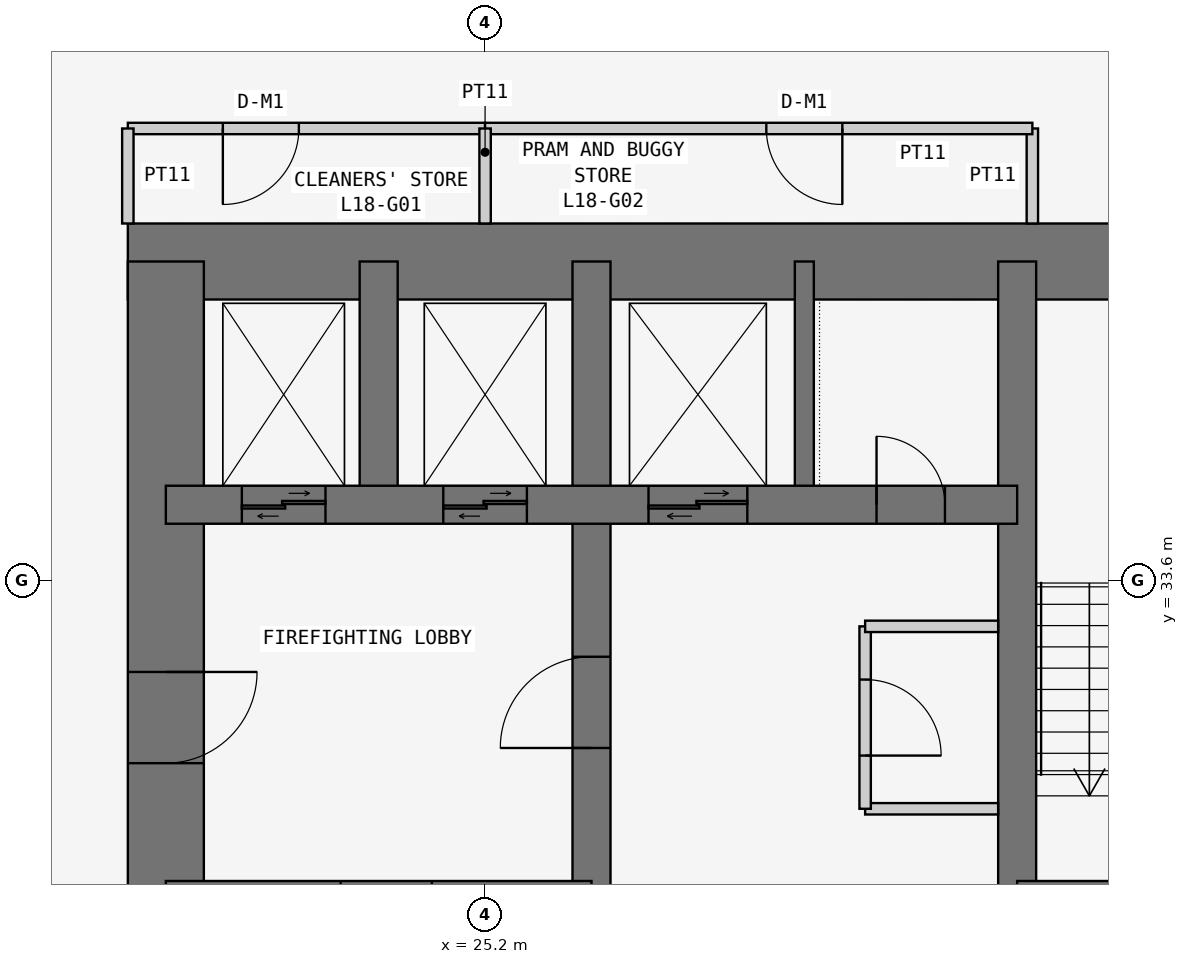
"""IFC4 building model, lengths in metres.
Left out: names, types, materials, properties, quantities, classifications, styles, units other than length and angle.
Written with IfcOpenShell. Run it as: python <this file> out.ifc"""

import sys

from ifc_helpers import new_model, si_unit, direction, frame, frame_2d, origin, place, context, subcontext, project, spatial, rectangle, extrude, element, fill, save


model = new_model("IFC4")
c1 = context("Model", 3, precision=1e-05, world=origin(), true_north=direction((0.0, 1.0)))
c2 = subcontext(c1, "Body", "Model", "MODEL_VIEW")
j1 = project(units=[si_unit("LENGTHUNIT", "METRE"), si_unit("PLANEANGLEUNIT", "RADIAN")], contexts=[c1])
p1 = place(None, origin())
s1 = spatial("IfcSite", under=j1, at=p1, CompositionType="ELEMENT")
p2 = place(p1, origin())
s2 = spatial("IfcBuilding", under=s1, at=p2, CompositionType="ELEMENT")
p3 = place(p2, frame((0.0, 0.0, 74.1)))
s3 = spatial("IfcBuildingStorey", under=s2, at=p3, CompositionType="ELEMENT", Elevation=74.1)
p4 = place(p3, frame((37.8, 37.8, 0.0), z_axis=(0.0, 0.0, 1.0), x_axis=(-1.0, 0.0, 0.0)))
e1 = element("IfcWall", 1, at=p4, inside=s3, PredefinedType="SHEAR", context=c2, shape_type="SweptSolid", body=[
    extrude(rectangle(XDim=17.3, YDim=1.0, at=frame_2d((8.65, 0.0))), origin(), (0.0, 0.0, 1.0), 3.6),
])
p5 = place(p3, frame((21.0, 37.8, 0.0), z_axis=(0.0, 0.0, 1.0), x_axis=(0.0, -1.0, 0.0)))
e2 = element("IfcWall", 2, at=p5, inside=s3, PredefinedType="SHEAR", context=c2, shape_type="SweptSolid", body=[
    extrude(rectangle(XDim=17.3, YDim=1.0, at=frame_2d((8.65, 0.0))), origin(), (0.0, 0.0, 1.0), 3.6),
])
p6 = place(p5, frame((5.4, 0.0, 0.0)))
e3 = element("IfcOpeningElement", 3, at=p6, cuts=e2, PredefinedType="OPENING", context=c2, shape_type="SweptSolid", body=[
    extrude(rectangle(XDim=1.2, YDim=2.1, at=frame_2d((0.6, 1.05))), frame((0.0, 0.51, 0.0), z_axis=(0.0, -1.0, 0.0), x_axis=(1.0, 0.0, 0.0)), (0.0, 0.0, 1.0), 1.02),
])
p7 = place(p3, frame((26.6, 21.0, 0.0), z_axis=(0.0, 0.0, 1.0), x_axis=(0.0, 1.0, 0.0)))
e4 = element("IfcWall", 4, at=p7, inside=s3, PredefinedType="SHEAR", context=c2, shape_type="SweptSolid", body=[
    extrude(rectangle(XDim=16.8, YDim=0.5, at=frame_2d((8.4, 0.0))), origin(), (0.0, 0.0, 1.0), 3.6),
])
p8 = place(p7, frame((10.4, 0.0, 0.0)))
e5 = element("IfcOpeningElement", 5, at=p8, cuts=e4, PredefinedType="OPENING", context=c2, shape_type="SweptSolid", body=[
    extrude(rectangle(XDim=1.2, YDim=2.1, at=frame_2d((0.6, 1.05))), frame((0.0, 0.26, 0.0), z_axis=(0.0, -1.0, 0.0), x_axis=(1.0, 0.0, 0.0)), (0.0, 0.0, 1.0), 0.52),
])
p9 = place(p3, frame((21.0, 29.4, 0.0), z_axis=(0.0, 0.0, 1.0), x_axis=(1.0, 0.0, 0.0)))
e6 = element("IfcWall", 6, at=p9, inside=s3, PredefinedType="SHEAR", context=c2, shape_type="SweptSolid", body=[
    extrude(rectangle(XDim=5.6, YDim=0.5, at=frame_2d((2.8, 0.0))), origin(), (0.0, 0.0, 1.0), 3.6),
])
p10 = place(p9, frame((2.3, 0.0, 0.0)))
e7 = element("IfcOpeningElement", 7, at=p10, cuts=e6, PredefinedType="OPENING", context=c2, shape_type="SweptSolid", body=[
    extrude(rectangle(XDim=1.2, YDim=2.1, at=frame_2d((0.6, 1.05))), frame((0.0, 0.26, 0.0), z_axis=(0.0, -1.0, 0.0), x_axis=(1.0, 0.0, 0.0)), (0.0, 0.0, 1.0), 0.52),
])
p11 = place(p3, frame((21.0, 34.6, 0.0), z_axis=(0.0, 0.0, 1.0), x_axis=(1.0, 0.0, 0.0)))
e8 = element("IfcWall", 8, at=p11, inside=s3, PredefinedType="SHEAR", context=c2, shape_type="SweptSolid", body=[
    extrude(rectangle(XDim=11.2, YDim=0.5, at=frame_2d((5.6, 0.0))), origin(), (0.0, 0.0, 1.0), 3.6),
])
p12 = place(p11, frame((9.35, 0.0, 0.0)))
e9 = element("IfcOpeningElement", 9, at=p12, cuts=e8, PredefinedType="OPENING", context=c2, shape_type="SweptSolid", body=[
    extrude(rectangle(XDim=0.9, YDim=2.1, at=frame_2d((0.45, 1.05))), frame((0.0, 0.26, 0.0), z_axis=(0.0, -1.0, 0.0), x_axis=(1.0, 0.0, 0.0)), (0.0, 0.0, 1.0), 0.52),
])
p13 = place(p11, frame((1.0, 0.0, 0.0)))
e10 = element("IfcOpeningElement", 10, at=p13, cuts=e8, PredefinedType="OPENING", context=c2, shape_type="SweptSolid", body=[
    extrude(rectangle(XDim=1.1, YDim=2.1, at=frame_2d((0.55, 1.05))), frame((0.0, 0.26, 0.0), z_axis=(0.0, -1.0, 0.0), x_axis=(1.0, 0.0, 0.0)), (0.0, 0.0, 1.0), 0.52),
])
p14 = place(p11, frame((3.65, 0.0, 0.0)))
e11 = element("IfcOpeningElement", 11, at=p14, cuts=e8, PredefinedType="OPENING", context=c2, shape_type="SweptSolid", body=[
    extrude(rectangle(XDim=1.1, YDim=2.1, at=frame_2d((0.55, 1.05))), frame((0.0, 0.26, 0.0), z_axis=(0.0, -1.0, 0.0), x_axis=(1.0, 0.0, 0.0)), (0.0, 0.0, 1.0), 0.52),
])
p15 = place(p11, frame((6.35, 0.0, 0.0)))
e12 = element("IfcOpeningElement", 12, at=p15, cuts=e8, PredefinedType="OPENING", context=c2, shape_type="SweptSolid", body=[
    extrude(rectangle(XDim=1.3, YDim=2.1, at=frame_2d((0.65, 1.05))), frame((0.0, 0.26, 0.0), z_axis=(0.0, -1.0, 0.0), x_axis=(1.0, 0.0, 0.0)), (0.0, 0.0, 1.0), 0.52),
])
p16 = place(p3, frame((23.8, 34.6, 0.0), z_axis=(0.0, 0.0, 1.0), x_axis=(0.0, 1.0, 0.0)))
e13 = element("IfcWall", 13, at=p16, inside=s3, PredefinedType="SHEAR", context=c2, shape_type="SweptSolid", body=[
    extrude(rectangle(XDim=3.2, YDim=0.5, at=frame_2d((1.6, 0.0))), origin(), (0.0, 0.0, 1.0), 3.6),
])
p17 = place(p3, frame((32.2, 29.15, 0.0), z_axis=(0.0, 0.0, 1.0), x_axis=(0.0, 1.0, 0.0)))
e14 = element("IfcWall", 14, at=p17, inside=s3, PredefinedType="SHEAR", context=c2, shape_type="SweptSolid", body=[
    extrude(rectangle(XDim=8.65, YDim=0.5, at=frame_2d((4.325, 0.0))), origin(), (0.0, 0.0, 1.0), 3.6),
])
p18 = place(p3, frame((32.2, 29.4, 0.0), z_axis=(0.0, 0.0, 1.0), x_axis=(1.0, 0.0, 0.0)))
e15 = element("IfcWall", 15, at=p18, inside=s3, PredefinedType="SHEAR", context=c2, shape_type="SweptSolid", body=[
    extrude(rectangle(XDim=5.6, YDim=0.5, at=frame_2d((2.8, 0.0))), origin(), (0.0, 0.0, 1.0), 3.6),
])
p19 = place(p18, frame((2.0, 0.0, 0.0)))
e16 = element("IfcOpeningElement", 16, at=p19, cuts=e15, PredefinedType="OPENING", context=c2, shape_type="SweptSolid", body=[
    extrude(rectangle(XDim=1.2, YDim=2.1, at=frame_2d((0.6, 1.05))), frame((0.0, 0.26, 0.0), z_axis=(0.0, -1.0, 0.0), x_axis=(1.0, 0.0, 0.0)), (0.0, 0.0, 1.0), 0.52),
])
p20 = place(p3, frame((29.4, 34.6, 0.0), z_axis=(0.0, 0.0, 1.0), x_axis=(0.0, 1.0, 0.0)))
e17 = element("IfcWall", 17, at=p20, inside=s3, PredefinedType="SHEAR", context=c2, shape_type="SweptSolid", body=[
    extrude(rectangle(XDim=3.2, YDim=0.25, at=frame_2d((1.6, 0.0))), origin(), (0.0, 0.0, 1.0), 3.6),
])
p21 = place(p3, frame((25.2, 39.55, 0.0), z_axis=(0.0, 0.0, 1.0), x_axis=(-1.0, 0.0, 0.0)))
e18 = element("IfcWall", 18, at=p21, inside=s3, PredefinedType="PARTITIONING", context=c2, shape_type="SweptSolid", body=[
    extrude(rectangle(XDim=4.7, YDim=0.15, at=frame_2d((2.35, 0.0))), origin(), (0.0, 0.0, 1.0), 3.45),
])
p22 = place(p21, frame((2.45, 0.0, 0.0)))
e19 = element("IfcOpeningElement", 19, at=p22, cuts=e18, PredefinedType="OPENING", context=c2, shape_type="SweptSolid", body=[
    extrude(rectangle(XDim=1.0, YDim=2.1, at=frame_2d((0.5, 1.05))), frame((0.0, 0.085, 0.0), z_axis=(0.0, -1.0, 0.0), x_axis=(1.0, 0.0, 0.0)), (0.0, 0.0, 1.0), 0.17),
])
for number, where, z_axis, x_axis in (
    (20, (20.5, 39.55, 0.0), (0.0, 0.0, 1.0), (0.0, -1.0, 0.0)),
    (21, (32.4, 38.3, 0.0), (0.0, 0.0, 1.0), (0.0, 1.0, 0.0)),
):
    element("IfcWall", number, at=place(p3, frame(where, z_axis=z_axis, x_axis=x_axis)), inside=s3, PredefinedType="PARTITIONING", context=c2, shape_type="SweptSolid", body=[
        extrude(rectangle(XDim=1.25, YDim=0.15, at=frame_2d((0.625, 0.0))), origin(), (0.0, 0.0, 1.0), 3.45),
    ])
p23 = place(p3, frame((32.4, 39.55, 0.0), z_axis=(0.0, 0.0, 1.0), x_axis=(-1.0, 0.0, 0.0)))
e22 = element("IfcWall", 22, at=p23, inside=s3, PredefinedType="PARTITIONING", context=c2, shape_type="SweptSolid", body=[
    extrude(rectangle(XDim=7.2, YDim=0.15, at=frame_2d((3.6, 0.0))), origin(), (0.0, 0.0, 1.0), 3.45),
])
p24 = place(p23, frame((2.5, 0.0, 0.0)))
e23 = element("IfcOpeningElement", 23, at=p24, cuts=e22, PredefinedType="OPENING", context=c2, shape_type="SweptSolid", body=[
    extrude(rectangle(XDim=1.0, YDim=2.1, at=frame_2d((0.5, 1.05))), frame((0.0, 0.085, 0.0), z_axis=(0.0, -1.0, 0.0), x_axis=(1.0, 0.0, 0.0)), (0.0, 0.0, 1.0), 0.17),
])
p25 = place(p3, frame((25.2, 38.3, 0.0), z_axis=(0.0, 0.0, 1.0), x_axis=(0.0, 1.0, 0.0)))
e24 = element("IfcWall", 24, at=p25, inside=s3, PredefinedType="PARTITIONING", context=c2, shape_type="SweptSolid", body=[
    extrude(rectangle(XDim=1.25, YDim=0.15, at=frame_2d((0.625, 0.0))), origin(), (0.0, 0.0, 1.0), 2.767),
])
p26 = place(p3, frame((31.95, 30.6, 0.0), z_axis=(0.0, 0.0, 1.0), x_axis=(-1.0, 0.0, 0.0)))
e25 = element("IfcWall", 25, at=p26, inside=s3, PredefinedType="PARTITIONING", context=c2, shape_type="SweptSolid", body=[
    extrude(rectangle(XDim=1.75, YDim=0.15, at=frame_2d((0.875, 0.0))), origin(), (0.0, 0.0, 1.0), 3.45),
])
p27 = place(p3, frame((30.2, 30.6, 0.0), z_axis=(0.0, 0.0, 1.0), x_axis=(0.0, 1.0, 0.0)))
e26 = element("IfcWall", 26, at=p27, inside=s3, PredefinedType="PARTITIONING", context=c2, shape_type="SweptSolid", body=[
    extrude(rectangle(XDim=2.4, YDim=0.15, at=frame_2d((1.2, 0.0))), origin(), (0.0, 0.0, 1.0), 3.45),
])
p28 = place(p27, frame((0.7, 0.0, 0.0)))
e27 = element("IfcOpeningElement", 27, at=p28, cuts=e26, PredefinedType="OPENING", context=c2, shape_type="SweptSolid", body=[
    extrude(rectangle(XDim=1.0, YDim=2.1, at=frame_2d((0.5, 1.05))), frame((0.0, 0.085, 0.0), z_axis=(0.0, -1.0, 0.0), x_axis=(1.0, 0.0, 0.0)), (0.0, 0.0, 1.0), 0.17),
])
p29 = place(p3, frame((30.2, 33.0, 0.0), z_axis=(0.0, 0.0, 1.0), x_axis=(1.0, 0.0, 0.0)))
e28 = element("IfcWall", 28, at=p29, inside=s3, PredefinedType="PARTITIONING", context=c2, shape_type="SweptSolid", body=[
    extrude(rectangle(XDim=1.75, YDim=0.15, at=frame_2d((0.875, 0.0))), origin(), (0.0, 0.0, 1.0), 3.45),
])
p30 = place(p22, origin())
e29 = element("IfcDoor", 29, at=p30, inside=s3, OperationType="SINGLE_SWING_RIGHT", PredefinedType="DOOR", context=c2, shape_type="SweptSolid", body=[
    extrude(rectangle(XDim=1.0, YDim=2.1, at=frame_2d((0.5, 1.05))), frame((0.0, 0.025, 0.0), z_axis=(0.0, -1.0, 0.0), x_axis=(1.0, 0.0, 0.0)), (0.0, 0.0, 1.0), 0.05),
])
fill(e19, e29)
p31 = place(p24, origin())
e30 = element("IfcDoor", 30, at=p31, inside=s3, OperationType="SINGLE_SWING_LEFT", PredefinedType="DOOR", context=c2, shape_type="SweptSolid", body=[
    extrude(rectangle(XDim=1.0, YDim=2.1, at=frame_2d((0.5, 1.05))), frame((0.0, 0.025, 0.0), z_axis=(0.0, -1.0, 0.0), x_axis=(1.0, 0.0, 0.0)), (0.0, 0.0, 1.0), 0.05),
])
fill(e23, e30)
p32 = place(p6, origin())
e31 = element("IfcDoor", 31, at=p32, inside=s3, OperationType="SINGLE_SWING_LEFT", PredefinedType="DOOR", context=c2, shape_type="SweptSolid", body=[
    extrude(rectangle(XDim=1.2, YDim=2.1, at=frame_2d((0.6, 1.05))), frame((0.0, 0.025, 0.0), z_axis=(0.0, -1.0, 0.0), x_axis=(1.0, 0.0, 0.0)), (0.0, 0.0, 1.0), 0.05),
])
fill(e3, e31)
p33 = place(p8, origin())
e32 = element("IfcDoor", 32, at=p33, inside=s3, OperationType="SINGLE_SWING_LEFT", PredefinedType="DOOR", context=c2, shape_type="SweptSolid", body=[
    extrude(rectangle(XDim=1.2, YDim=2.1, at=frame_2d((0.6, 1.05))), frame((0.0, 0.025, 0.0), z_axis=(0.0, -1.0, 0.0), x_axis=(1.0, 0.0, 0.0)), (0.0, 0.0, 1.0), 0.05),
])
fill(e5, e32)
p34 = place(p12, origin())
e33 = element("IfcDoor", 33, at=p34, inside=s3, OperationType="SINGLE_SWING_LEFT", PredefinedType="DOOR", context=c2, shape_type="SweptSolid", body=[
    extrude(rectangle(XDim=0.9, YDim=2.1, at=frame_2d((0.45, 1.05))), frame((0.0, 0.025, 0.0), z_axis=(0.0, -1.0, 0.0), x_axis=(1.0, 0.0, 0.0)), (0.0, 0.0, 1.0), 0.05),
])
fill(e9, e33)
p35 = place(p28, frame((1.0, 0.0, 0.0), z_axis=(0.0, 0.0, 1.0), x_axis=(-1.0, 0.0, 0.0)))
e34 = element("IfcDoor", 34, at=p35, inside=s3, OperationType="SINGLE_SWING_RIGHT", PredefinedType="DOOR", context=c2, shape_type="SweptSolid", body=[
    extrude(rectangle(XDim=1.0, YDim=2.1, at=frame_2d((0.5, 1.05))), frame((0.0, 0.025, 0.0), z_axis=(0.0, -1.0, 0.0), x_axis=(1.0, 0.0, 0.0)), (0.0, 0.0, 1.0), 0.05),
])
fill(e27, e34)
p36 = place(p13, origin())
e35 = element("IfcDoor", 35, at=p36, inside=s3, OperationType="DOUBLE_DOOR_SLIDING", PredefinedType="DOOR", context=c2, shape_type="SweptSolid", body=[
    extrude(rectangle(XDim=1.1, YDim=2.1, at=frame_2d((0.55, 1.05))), frame((0.0, 0.025, 0.0), z_axis=(0.0, -1.0, 0.0), x_axis=(1.0, 0.0, 0.0)), (0.0, 0.0, 1.0), 0.05),
])
fill(e10, e35)
p37 = place(p14, origin())
e36 = element("IfcDoor", 36, at=p37, inside=s3, OperationType="DOUBLE_DOOR_SLIDING", PredefinedType="DOOR", context=c2, shape_type="SweptSolid", body=[
    extrude(rectangle(XDim=1.1, YDim=2.1, at=frame_2d((0.55, 1.05))), frame((0.0, 0.025, 0.0), z_axis=(0.0, -1.0, 0.0), x_axis=(1.0, 0.0, 0.0)), (0.0, 0.0, 1.0), 0.05),
])
fill(e11, e36)
p38 = place(p15, origin())
e37 = element("IfcDoor", 37, at=p38, inside=s3, OperationType="DOUBLE_DOOR_SLIDING", PredefinedType="DOOR", context=c2, shape_type="SweptSolid", body=[
    extrude(rectangle(XDim=1.3, YDim=2.1, at=frame_2d((0.65, 1.05))), frame((0.0, 0.025, 0.0), z_axis=(0.0, -1.0, 0.0), x_axis=(1.0, 0.0, 0.0)), (0.0, 0.0, 1.0), 0.05),
])
fill(e12, e37)
save(model, sys.argv[1])
